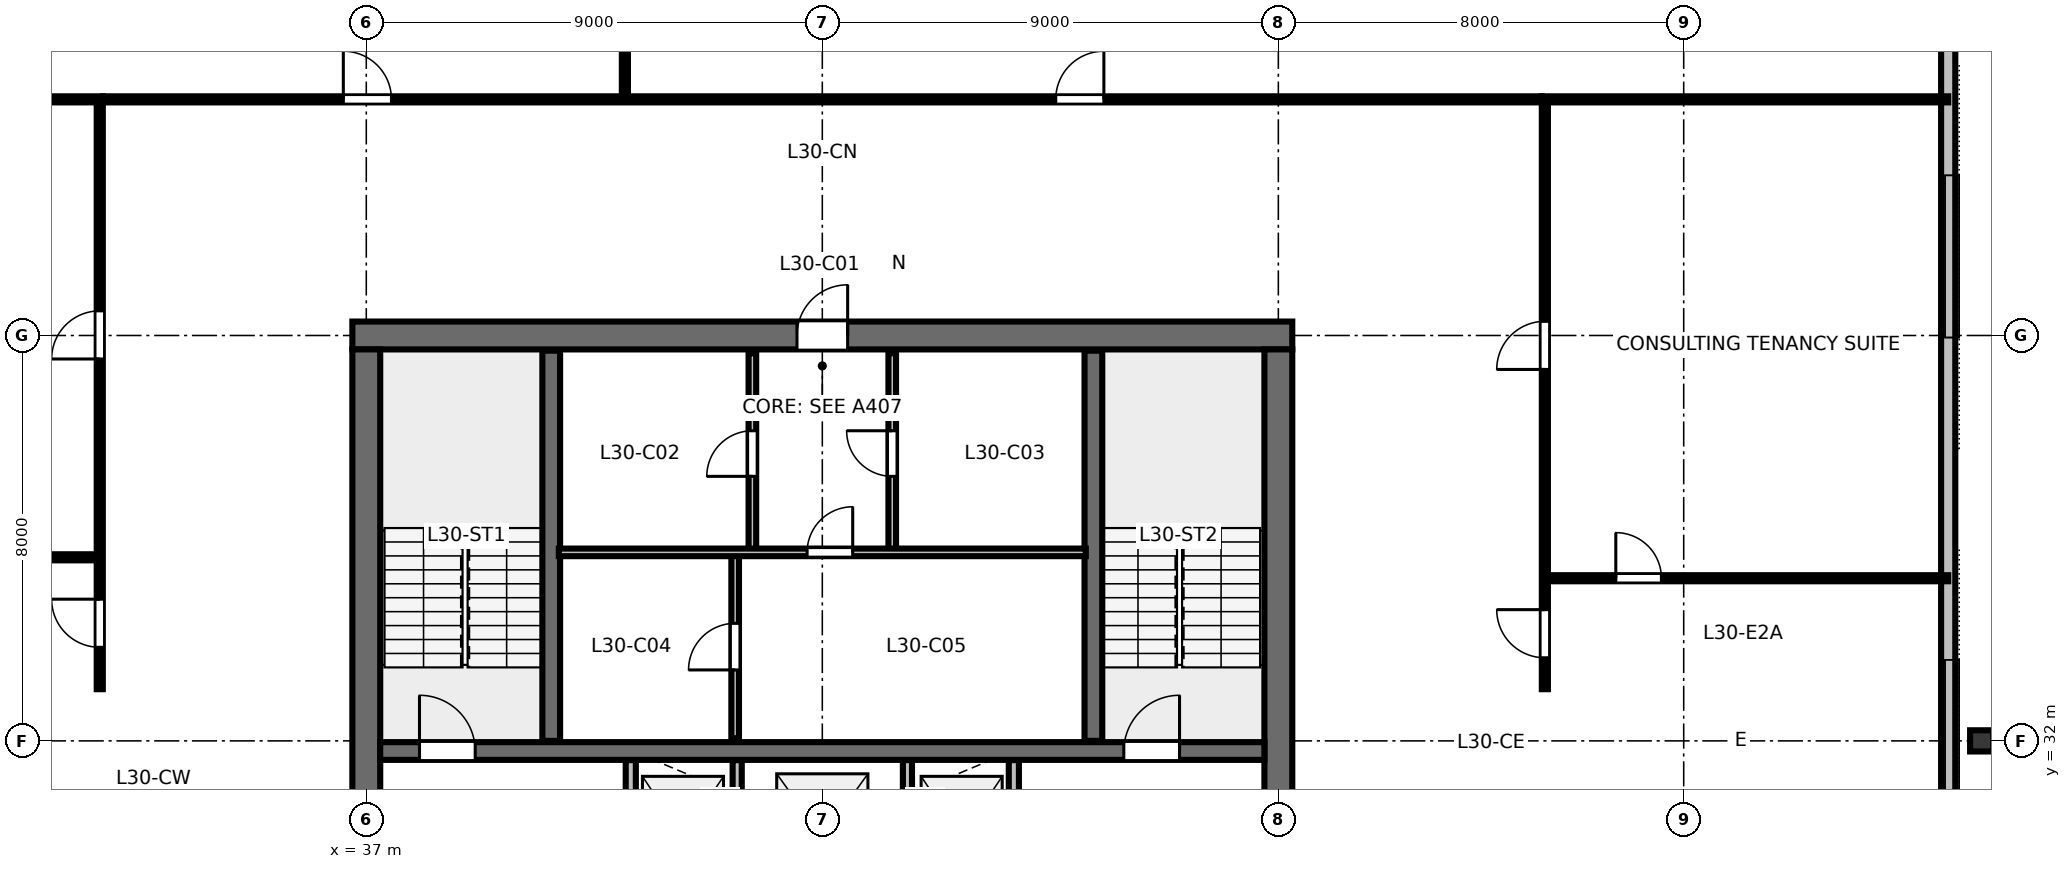
"""IFC4 building model, lengths in metres.
Left out: names, types, materials, properties, quantities, classifications, styles, units other than length and angle.
Written with IfcOpenShell. Run it as: python <this file> out.ifc"""

import sys

from ifc_helpers import new_model, si_unit, direction, frame, frame_2d, origin, origin_2d, place, context, subcontext, project, spatial, rectangle, i_section, extrude, element, fill, save


model = new_model("IFC4")
c1 = context("Model", 3, precision=1e-05, world=origin(), true_north=direction((0.0, 1.0)))
c2 = subcontext(c1, "Body", "Model", "MODEL_VIEW")
j1 = project(units=[si_unit("LENGTHUNIT", "METRE"), si_unit("PLANEANGLEUNIT", "RADIAN")], contexts=[c1])
p1 = place(None, origin())
s1 = spatial("IfcSite", under=j1, at=p1, CompositionType="ELEMENT")
p2 = place(p1, origin())
s2 = spatial("IfcBuilding", under=s1, at=p2, CompositionType="ELEMENT")
p3 = place(p2, frame((0.0, 0.0, 116.8)))
s3 = spatial("IfcBuildingStorey", under=s2, at=p3, CompositionType="ELEMENT", Elevation=116.8)
p4 = place(p3, frame((36.725, 40.0, 0.0), z_axis=(0.0, 0.0, 1.0), x_axis=(1.0, 0.0, 0.0)))
e1 = element("IfcWall", 1, at=p4, inside=s3, PredefinedType="SHEAR", context=c2, shape_type="SweptSolid", body=[
    extrude(rectangle(XDim=18.55, YDim=0.55, at=frame_2d((9.275, 0.0))), origin(), (0.0, 0.0, 1.0), 3.36),
])
p5 = place(p4, frame((8.775, 0.0, 0.0)))
e2 = element("IfcOpeningElement", 2, at=p5, cuts=e1, PredefinedType="OPENING", context=c2, shape_type="SweptSolid", body=[
    extrude(rectangle(XDim=1.0, YDim=2.15, at=frame_2d((0.5, 1.075))), frame((0.0, 0.285, 0.0), z_axis=(0.0, -1.0, 0.0), x_axis=(1.0, 0.0, 0.0)), (0.0, 0.0, 1.0), 0.57),
])
p6 = place(p3, frame((37.0, 24.275, 0.0), z_axis=(0.0, 0.0, 1.0), x_axis=(0.0, 1.0, 0.0)))
e3 = element("IfcWall", 3, at=p6, inside=s3, PredefinedType="SHEAR", context=c2, shape_type="SweptSolid", body=[
    extrude(rectangle(XDim=15.45, YDim=0.55, at=frame_2d((7.725, 0.0))), origin(), (0.0, 0.0, 1.0), 3.36),
])
p7 = place(p6, frame((5.25, 0.0, 0.0)))
e4 = element("IfcOpeningElement", 4, at=p7, cuts=e3, PredefinedType="OPENING", context=c2, shape_type="SweptSolid", body=[
    extrude(rectangle(XDim=1.15, YDim=2.15, at=frame_2d((0.575, 1.075))), frame((0.0, 0.285, 0.0), z_axis=(0.0, -1.0, 0.0), x_axis=(1.0, 0.0, 0.0)), (0.0, 0.0, 1.0), 0.57),
])
p8 = place(p3, frame((55.0, 24.275, 0.0), z_axis=(0.0, 0.0, 1.0), x_axis=(0.0, 1.0, 0.0)))
e5 = element("IfcWall", 5, at=p8, inside=s3, PredefinedType="SHEAR", context=c2, shape_type="SweptSolid", body=[
    extrude(rectangle(XDim=15.45, YDim=0.55, at=frame_2d((7.725, 0.0))), origin(), (0.0, 0.0, 1.0), 3.36),
])
p9 = place(p8, frame((5.25, 0.0, 0.0)))
e6 = element("IfcOpeningElement", 6, at=p9, cuts=e5, PredefinedType="OPENING", context=c2, shape_type="SweptSolid", body=[
    extrude(rectangle(XDim=1.15, YDim=2.15, at=frame_2d((0.575, 1.075))), frame((0.0, 0.285, 0.0), z_axis=(0.0, -1.0, 0.0), x_axis=(1.0, 0.0, 0.0)), (0.0, 0.0, 1.0), 0.57),
])
p10 = place(p3, frame((37.275, 31.8, 0.0), z_axis=(0.0, 0.0, 1.0), x_axis=(1.0, 0.0, 0.0)))
e7 = element("IfcWall", 7, at=p10, inside=s3, PredefinedType="SHEAR", context=c2, shape_type="SweptSolid", body=[
    extrude(rectangle(XDim=17.45, YDim=0.35, at=frame_2d((8.725, 0.0))), origin(), (0.0, 0.0, 1.0), 3.36),
])
p11 = place(p10, frame((0.775, 0.0, 0.0)))
e8 = element("IfcOpeningElement", 8, at=p11, cuts=e7, PredefinedType="OPENING", context=c2, shape_type="SweptSolid", body=[
    extrude(rectangle(XDim=1.1, YDim=2.15, at=frame_2d((0.55, 1.075))), frame((0.0, 0.185, 0.0), z_axis=(0.0, -1.0, 0.0), x_axis=(1.0, 0.0, 0.0)), (0.0, 0.0, 1.0), 0.37),
])
p12 = place(p10, frame((14.675, 0.0, 0.0)))
e9 = element("IfcOpeningElement", 9, at=p12, cuts=e7, PredefinedType="OPENING", context=c2, shape_type="SweptSolid", body=[
    extrude(rectangle(XDim=1.1, YDim=2.15, at=frame_2d((0.55, 1.075))), frame((0.0, 0.185, 0.0), z_axis=(0.0, -1.0, 0.0), x_axis=(1.0, 0.0, 0.0)), (0.0, 0.0, 1.0), 0.37),
])
p13 = place(p3, frame((68.88, 32.0, 0.0), z_axis=(0.0, 0.0, 1.0), x_axis=(0.0, 1.0, 0.0)))
e10 = element("IfcColumn", 10, at=p13, inside=s3, PredefinedType="COLUMN", context=c2, shape_type="SweptSolid", body=[
    extrude(i_section(OverallWidth=0.418, OverallDepth=0.455, WebThickness=0.042, FlangeThickness=0.068, FilletRadius=0.025, at=origin_2d()), origin(), (0.0, 0.0, 1.0), 3.358),
])
p14 = place(p3, frame((68.22, 16.76, 0.0), z_axis=(0.0, 0.0, 1.0), x_axis=(0.0, 1.0, 0.0)))
e11 = element("IfcWall", 11, at=p14, inside=s3, PredefinedType="STANDARD", context=c2, shape_type="SweptSolid", body=[
    extrude(rectangle(XDim=30.48, YDim=0.28, at=frame_2d((15.24, 0.0))), origin(), (0.0, 0.0, 1.0), 3.36),
])
for number, where, z_axis, x_axis in (
    (12, (40.65, 32.0, 0.0), (0.0, 0.0, 1.0), (0.0, 1.0, 0.0)),
    (13, (51.35, 32.0, 0.0), (0.0, 0.0, 1.0), (0.0, 1.0, 0.0)),
):
    element("IfcWall", number, at=place(p3, frame(where, z_axis=z_axis, x_axis=x_axis)), inside=s3, PredefinedType="SHEAR", context=c2, shape_type="SweptSolid", body=[
        extrude(rectangle(XDim=7.7, YDim=0.35, at=frame_2d((3.85, 0.0))), origin(), (0.0, 0.0, 1.0), 3.6),
    ])
p15 = place(p3, frame((44.62, 35.72, 0.0), z_axis=(0.0, 0.0, 1.0), x_axis=(0.0, 1.0, 0.0)))
e14 = element("IfcWall", 14, at=p15, inside=s3, PredefinedType="PARTITIONING", context=c2, shape_type="SweptSolid", body=[
    extrude(rectangle(XDim=3.93, YDim=0.15, at=frame_2d((1.965, 0.0))), origin(), (0.0, 0.0, 1.0), 3.36),
])
p16 = place(p15, frame((1.5, 0.0, 0.0)))
e15 = element("IfcOpeningElement", 15, at=p16, cuts=e14, PredefinedType="OPENING", context=c2, shape_type="SweptSolid", body=[
    extrude(rectangle(XDim=0.9, YDim=2.15, at=frame_2d((0.45, 1.075))), frame((0.0, 0.085, 0.0), z_axis=(0.0, -1.0, 0.0), x_axis=(1.0, 0.0, 0.0)), (0.0, 0.0, 1.0), 0.17),
])
p17 = place(p3, frame((47.38, 35.72, 0.0), z_axis=(0.0, 0.0, 1.0), x_axis=(0.0, 1.0, 0.0)))
e16 = element("IfcWall", 16, at=p17, inside=s3, PredefinedType="PARTITIONING", context=c2, shape_type="SweptSolid", body=[
    extrude(rectangle(XDim=3.93, YDim=0.15, at=frame_2d((1.965, 0.0))), origin(), (0.0, 0.0, 1.0), 3.36),
])
p18 = place(p17, frame((1.5, 0.0, 0.0)))
e17 = element("IfcOpeningElement", 17, at=p18, cuts=e16, PredefinedType="OPENING", context=c2, shape_type="SweptSolid", body=[
    extrude(rectangle(XDim=0.9, YDim=2.15, at=frame_2d((0.45, 1.075))), frame((0.0, 0.085, 0.0), z_axis=(0.0, -1.0, 0.0), x_axis=(1.0, 0.0, 0.0)), (0.0, 0.0, 1.0), 0.17),
])
p19 = place(p3, frame((44.28, 32.05, 0.0), z_axis=(0.0, 0.0, 1.0), x_axis=(0.0, 1.0, 0.0)))
e18 = element("IfcWall", 18, at=p19, inside=s3, PredefinedType="PARTITIONING", context=c2, shape_type="SweptSolid", body=[
    extrude(rectangle(XDim=3.67, YDim=0.15, at=frame_2d((1.835, 0.0))), origin(), (0.0, 0.0, 1.0), 3.36),
])
p20 = place(p19, frame((1.35, 0.0, 0.0)))
e19 = element("IfcOpeningElement", 19, at=p20, cuts=e18, PredefinedType="OPENING", context=c2, shape_type="SweptSolid", body=[
    extrude(rectangle(XDim=0.92, YDim=2.15, at=frame_2d((0.46, 1.075))), frame((0.0, 0.085, 0.0), z_axis=(0.0, -1.0, 0.0), x_axis=(1.0, 0.0, 0.0)), (0.0, 0.0, 1.0), 0.17),
])
p21 = place(p3, frame((40.8, 35.72, 0.0), z_axis=(0.0, 0.0, 1.0), x_axis=(1.0, 0.0, 0.0)))
e20 = element("IfcWall", 20, at=p21, inside=s3, PredefinedType="PARTITIONING", context=c2, shape_type="SweptSolid", body=[
    extrude(rectangle(XDim=10.4, YDim=0.15, at=frame_2d((5.2, 0.0))), origin(), (0.0, 0.0, 1.0), 3.36),
])
p22 = place(p21, frame((4.9, 0.0, 0.0)))
e21 = element("IfcOpeningElement", 21, at=p22, cuts=e20, PredefinedType="OPENING", context=c2, shape_type="SweptSolid", body=[
    extrude(rectangle(XDim=0.9, YDim=2.15, at=frame_2d((0.45, 1.075))), frame((0.0, 0.085, 0.0), z_axis=(0.0, -1.0, 0.0), x_axis=(1.0, 0.0, 0.0)), (0.0, 0.0, 1.0), 0.17),
])
p23 = place(p3, frame((42.22, 28.58, 0.0), z_axis=(0.0, 0.0, 1.0), x_axis=(0.0, 1.0, 0.0)))
e22 = element("IfcWall", 22, at=p23, inside=s3, PredefinedType="PARTITIONING", context=c2, shape_type="SweptSolid", body=[
    extrude(rectangle(XDim=3.04, YDim=0.2, at=frame_2d((1.52, 0.0))), origin(), (0.0, 0.0, 1.0), 3.36),
])
p24 = place(p23, frame((0.95, 0.0, 0.0)))
e23 = element("IfcOpeningElement", 23, at=p24, cuts=e22, PredefinedType="OPENING", context=c2, shape_type="SweptSolid", body=[
    extrude(rectangle(XDim=1.05, YDim=2.15, at=frame_2d((0.525, 1.075))), frame((0.0, 0.11, 0.0), z_axis=(0.0, -1.0, 0.0), x_axis=(1.0, 0.0, 0.0)), (0.0, 0.0, 1.0), 0.22),
])
p25 = place(p3, frame((49.78, 28.58, 0.0), z_axis=(0.0, 0.0, 1.0), x_axis=(0.0, 1.0, 0.0)))
e24 = element("IfcWall", 24, at=p25, inside=s3, PredefinedType="PARTITIONING", context=c2, shape_type="SweptSolid", body=[
    extrude(rectangle(XDim=3.04, YDim=0.2, at=frame_2d((1.52, 0.0))), origin(), (0.0, 0.0, 1.0), 3.36),
])
p26 = place(p25, frame((0.95, 0.0, 0.0)))
e25 = element("IfcOpeningElement", 25, at=p26, cuts=e24, PredefinedType="OPENING", context=c2, shape_type="SweptSolid", body=[
    extrude(rectangle(XDim=1.05, YDim=2.15, at=frame_2d((0.525, 1.075))), frame((0.0, 0.11, 0.0), z_axis=(0.0, -1.0, 0.0), x_axis=(1.0, 0.0, 0.0)), (0.0, 0.0, 1.0), 0.22),
])
for number, where, z_axis, x_axis in (
    (26, (44.32, 28.58, 0.0), (0.0, 0.0, 1.0), (0.0, 1.0, 0.0)),
    (27, (47.68, 28.58, 0.0), (0.0, 0.0, 1.0), (0.0, 1.0, 0.0)),
):
    element("IfcWall", number, at=place(p3, frame(where, z_axis=z_axis, x_axis=x_axis)), inside=s3, PredefinedType="PARTITIONING", context=c2, shape_type="SweptSolid", body=[
        extrude(rectangle(XDim=3.04, YDim=0.18, at=frame_2d((1.52, 0.0))), origin(), (0.0, 0.0, 1.0), 3.36),
    ])
p27 = place(p3, frame((42.104, 44.66, 0.0), z_axis=(0.0, 0.0, 1.0), x_axis=(0.0, 1.0, 0.0)))
e28 = element("IfcWall", 28, at=p27, inside=s3, PredefinedType="PARTITIONING", context=c2, shape_type="SweptSolid", body=[
    extrude(rectangle(XDim=6.96, YDim=0.12, at=frame_2d((3.48, 0.0))), origin(), (0.0, 0.0, 1.0), 2.64),
])
p28 = place(p27, frame((1.4, 0.0, 0.0)))
e29 = element("IfcOpeningElement", 29, at=p28, cuts=e28, PredefinedType="OPENING", context=c2, shape_type="SweptSolid", body=[
    extrude(rectangle(XDim=0.9, YDim=2.15, at=frame_2d((0.45, 1.075))), frame((0.0, 0.07, 0.0), z_axis=(0.0, -1.0, 0.0), x_axis=(1.0, 0.0, 0.0)), (0.0, 0.0, 1.0), 0.14),
])
p29 = place(p3, frame((31.8, 44.66, 0.0), z_axis=(0.0, 0.0, 1.0), x_axis=(1.0, 0.0, 0.0)))
e30 = element("IfcWall", 30, at=p29, inside=s3, PredefinedType="PARTITIONING", context=c2, shape_type="SweptSolid", body=[
    extrude(rectangle(XDim=28.4, YDim=0.12, at=frame_2d((14.2, 0.0))), origin(), (0.0, 0.0, 1.0), 2.64),
])
p30 = place(p29, frame((4.747, 0.0, 0.0)))
e31 = element("IfcOpeningElement", 31, at=p30, cuts=e30, PredefinedType="OPENING", context=c2, shape_type="SweptSolid", body=[
    extrude(rectangle(XDim=0.95, YDim=2.15, at=frame_2d((0.475, 1.075))), frame((0.0, 0.07, 0.0), z_axis=(0.0, -1.0, 0.0), x_axis=(1.0, 0.0, 0.0)), (0.0, 0.0, 1.0), 0.14),
])
p31 = place(p29, frame((18.807, 0.0, 0.0)))
e32 = element("IfcOpeningElement", 32, at=p31, cuts=e30, PredefinedType="OPENING", context=c2, shape_type="SweptSolid", body=[
    extrude(rectangle(XDim=0.95, YDim=2.15, at=frame_2d((0.475, 1.075))), frame((0.0, 0.07, 0.0), z_axis=(0.0, -1.0, 0.0), x_axis=(1.0, 0.0, 0.0)), (0.0, 0.0, 1.0), 0.14),
])
p32 = place(p3, frame((31.74, 35.623, 0.0), z_axis=(0.0, 0.0, 1.0), x_axis=(-1.0, 0.0, 0.0)))
e33 = element("IfcWall", 33, at=p32, inside=s3, PredefinedType="PARTITIONING", context=c2, shape_type="SweptSolid", body=[
    extrude(rectangle(XDim=7.96, YDim=0.12, at=frame_2d((3.98, 0.0))), origin(), (0.0, 0.0, 1.0), 2.64),
])
p33 = place(p32, frame((1.4, 0.0, 0.0)))
e34 = element("IfcOpeningElement", 34, at=p33, cuts=e33, PredefinedType="OPENING", context=c2, shape_type="SweptSolid", body=[
    extrude(rectangle(XDim=0.9, YDim=2.15, at=frame_2d((0.45, 1.075))), frame((0.0, 0.07, 0.0), z_axis=(0.0, -1.0, 0.0), x_axis=(1.0, 0.0, 0.0)), (0.0, 0.0, 1.0), 0.14),
])
p34 = place(p3, frame((31.74, 33.02, 0.0), z_axis=(0.0, 0.0, 1.0), x_axis=(0.0, 1.0, 0.0)))
e35 = element("IfcWall", 35, at=p34, inside=s3, PredefinedType="PARTITIONING", context=c2, shape_type="SweptSolid", body=[
    extrude(rectangle(XDim=11.58, YDim=0.12, at=frame_2d((5.79, 0.0))), origin(), (0.0, 0.0, 1.0), 2.64),
])
p35 = place(p34, frame((0.826, 0.0, 0.0)))
e36 = element("IfcOpeningElement", 36, at=p35, cuts=e35, PredefinedType="OPENING", context=c2, shape_type="SweptSolid", body=[
    extrude(rectangle(XDim=0.95, YDim=2.15, at=frame_2d((0.475, 1.075))), frame((0.0, 0.07, 0.0), z_axis=(0.0, -1.0, 0.0), x_axis=(1.0, 0.0, 0.0)), (0.0, 0.0, 1.0), 0.14),
])
p36 = place(p34, frame((6.516, 0.0, 0.0)))
e37 = element("IfcOpeningElement", 37, at=p36, cuts=e35, PredefinedType="OPENING", context=c2, shape_type="SweptSolid", body=[
    extrude(rectangle(XDim=0.95, YDim=2.15, at=frame_2d((0.475, 1.075))), frame((0.0, 0.07, 0.0), z_axis=(0.0, -1.0, 0.0), x_axis=(1.0, 0.0, 0.0)), (0.0, 0.0, 1.0), 0.14),
])
p37 = place(p3, frame((60.26, 35.209, 0.0), z_axis=(0.0, 0.0, 1.0), x_axis=(1.0, 0.0, 0.0)))
e38 = element("IfcWall", 38, at=p37, inside=s3, PredefinedType="PARTITIONING", context=c2, shape_type="SweptSolid", body=[
    extrude(rectangle(XDim=7.96, YDim=0.12, at=frame_2d((3.98, 0.0))), origin(), (0.0, 0.0, 1.0), 2.64),
])
p38 = place(p37, frame((1.4, 0.0, 0.0)))
e39 = element("IfcOpeningElement", 39, at=p38, cuts=e38, PredefinedType="OPENING", context=c2, shape_type="SweptSolid", body=[
    extrude(rectangle(XDim=0.9, YDim=2.15, at=frame_2d((0.45, 1.075))), frame((0.0, 0.07, 0.0), z_axis=(0.0, -1.0, 0.0), x_axis=(1.0, 0.0, 0.0)), (0.0, 0.0, 1.0), 0.14),
])
p39 = place(p3, frame((60.26, 33.02, 0.0), z_axis=(0.0, 0.0, 1.0), x_axis=(0.0, 1.0, 0.0)))
e40 = element("IfcWall", 40, at=p39, inside=s3, PredefinedType="PARTITIONING", context=c2, shape_type="SweptSolid", body=[
    extrude(rectangle(XDim=11.58, YDim=0.12, at=frame_2d((5.79, 0.0))), origin(), (0.0, 0.0, 1.0), 2.64),
])
p40 = place(p39, frame((0.62, 0.0, 0.0)))
e41 = element("IfcOpeningElement", 41, at=p40, cuts=e40, PredefinedType="OPENING", context=c2, shape_type="SweptSolid", body=[
    extrude(rectangle(XDim=0.95, YDim=2.15, at=frame_2d((0.475, 1.075))), frame((0.0, 0.07, 0.0), z_axis=(0.0, -1.0, 0.0), x_axis=(1.0, 0.0, 0.0)), (0.0, 0.0, 1.0), 0.14),
])
p41 = place(p39, frame((6.31, 0.0, 0.0)))
e42 = element("IfcOpeningElement", 42, at=p41, cuts=e40, PredefinedType="OPENING", context=c2, shape_type="SweptSolid", body=[
    extrude(rectangle(XDim=0.95, YDim=2.15, at=frame_2d((0.475, 1.075))), frame((0.0, 0.07, 0.0), z_axis=(0.0, -1.0, 0.0), x_axis=(1.0, 0.0, 0.0)), (0.0, 0.0, 1.0), 0.14),
])
for number, where, z_axis, x_axis in (
    (43, (31.8, 44.66, 0.0), (0.0, 0.0, 1.0), (-1.0, 0.0, 0.0)),
    (44, (60.2, 44.66, 0.0), (0.0, 0.0, 1.0), (1.0, 0.0, 0.0)),
):
    element("IfcWall", number, at=place(p3, frame(where, z_axis=z_axis, x_axis=x_axis)), inside=s3, PredefinedType="PARTITIONING", context=c2, shape_type="SweptSolid", body=[
        extrude(rectangle(XDim=8.02, YDim=0.12, at=frame_2d((4.01, 0.0))), origin(), (0.0, 0.0, 1.0), 2.64),
    ])
p42 = place(p11, origin())
e45 = element("IfcDoor", 45, at=p42, inside=s3, OperationType="SINGLE_SWING_LEFT", PredefinedType="DOOR", context=c2, shape_type="SweptSolid", body=[
    extrude(rectangle(XDim=1.1, YDim=2.15, at=frame_2d((0.55, 1.075))), frame((0.0, 0.025, 0.0), z_axis=(0.0, -1.0, 0.0), x_axis=(1.0, 0.0, 0.0)), (0.0, 0.0, 1.0), 0.05),
])
fill(e8, e45)
p43 = place(p12, origin())
e46 = element("IfcDoor", 46, at=p43, inside=s3, OperationType="SINGLE_SWING_RIGHT", PredefinedType="DOOR", context=c2, shape_type="SweptSolid", body=[
    extrude(rectangle(XDim=1.1, YDim=2.15, at=frame_2d((0.55, 1.075))), frame((0.0, 0.025, 0.0), z_axis=(0.0, -1.0, 0.0), x_axis=(1.0, 0.0, 0.0)), (0.0, 0.0, 1.0), 0.05),
])
fill(e9, e46)
p44 = place(p5, origin())
e47 = element("IfcDoor", 47, at=p44, inside=s3, OperationType="SINGLE_SWING_RIGHT", PredefinedType="DOOR", context=c2, shape_type="SweptSolid", body=[
    extrude(rectangle(XDim=1.0, YDim=2.15, at=frame_2d((0.5, 1.075))), frame((0.0, 0.025, 0.0), z_axis=(0.0, -1.0, 0.0), x_axis=(1.0, 0.0, 0.0)), (0.0, 0.0, 1.0), 0.05),
])
fill(e2, e47)
p45 = place(p16, origin())
e48 = element("IfcDoor", 48, at=p45, inside=s3, OperationType="SINGLE_SWING_LEFT", PredefinedType="DOOR", context=c2, shape_type="SweptSolid", body=[
    extrude(rectangle(XDim=0.9, YDim=2.15, at=frame_2d((0.45, 1.075))), frame((0.0, 0.025, 0.0), z_axis=(0.0, -1.0, 0.0), x_axis=(1.0, 0.0, 0.0)), (0.0, 0.0, 1.0), 0.05),
])
fill(e15, e48)
p46 = place(p18, origin())
e49 = element("IfcDoor", 49, at=p46, inside=s3, OperationType="SINGLE_SWING_RIGHT", PredefinedType="DOOR", context=c2, shape_type="SweptSolid", body=[
    extrude(rectangle(XDim=0.9, YDim=2.15, at=frame_2d((0.45, 1.075))), frame((0.0, 0.025, 0.0), z_axis=(0.0, -1.0, 0.0), x_axis=(1.0, 0.0, 0.0)), (0.0, 0.0, 1.0), 0.05),
])
fill(e17, e49)
p47 = place(p20, origin())
e50 = element("IfcDoor", 50, at=p47, inside=s3, OperationType="SINGLE_SWING_LEFT", PredefinedType="DOOR", context=c2, shape_type="SweptSolid", body=[
    extrude(rectangle(XDim=0.92, YDim=2.15, at=frame_2d((0.46, 1.075))), frame((0.0, 0.025, 0.0), z_axis=(0.0, -1.0, 0.0), x_axis=(1.0, 0.0, 0.0)), (0.0, 0.0, 1.0), 0.05),
])
fill(e19, e50)
p48 = place(p22, origin())
e51 = element("IfcDoor", 51, at=p48, inside=s3, OperationType="SINGLE_SWING_RIGHT", PredefinedType="DOOR", context=c2, shape_type="SweptSolid", body=[
    extrude(rectangle(XDim=0.9, YDim=2.15, at=frame_2d((0.45, 1.075))), frame((0.0, 0.025, 0.0), z_axis=(0.0, -1.0, 0.0), x_axis=(1.0, 0.0, 0.0)), (0.0, 0.0, 1.0), 0.05),
])
fill(e21, e51)
p49 = place(p30, origin())
e52 = element("IfcDoor", 52, at=p49, inside=s3, OperationType="SINGLE_SWING_LEFT", PredefinedType="DOOR", context=c2, shape_type="SweptSolid", body=[
    extrude(rectangle(XDim=0.95, YDim=2.15, at=frame_2d((0.475, 1.075))), frame((0.0, 0.025, 0.0), z_axis=(0.0, -1.0, 0.0), x_axis=(1.0, 0.0, 0.0)), (0.0, 0.0, 1.0), 0.05),
])
fill(e31, e52)
p50 = place(p31, origin())
e53 = element("IfcDoor", 53, at=p50, inside=s3, OperationType="SINGLE_SWING_RIGHT", PredefinedType="DOOR", context=c2, shape_type="SweptSolid", body=[
    extrude(rectangle(XDim=0.95, YDim=2.15, at=frame_2d((0.475, 1.075))), frame((0.0, 0.025, 0.0), z_axis=(0.0, -1.0, 0.0), x_axis=(1.0, 0.0, 0.0)), (0.0, 0.0, 1.0), 0.05),
])
fill(e32, e53)
p51 = place(p35, origin())
e54 = element("IfcDoor", 54, at=p51, inside=s3, OperationType="SINGLE_SWING_RIGHT", PredefinedType="DOOR", context=c2, shape_type="SweptSolid", body=[
    extrude(rectangle(XDim=0.95, YDim=2.15, at=frame_2d((0.475, 1.075))), frame((0.0, 0.025, 0.0), z_axis=(0.0, -1.0, 0.0), x_axis=(1.0, 0.0, 0.0)), (0.0, 0.0, 1.0), 0.05),
])
fill(e36, e54)
p52 = place(p36, origin())
e55 = element("IfcDoor", 55, at=p52, inside=s3, OperationType="SINGLE_SWING_LEFT", PredefinedType="DOOR", context=c2, shape_type="SweptSolid", body=[
    extrude(rectangle(XDim=0.95, YDim=2.15, at=frame_2d((0.475, 1.075))), frame((0.0, 0.025, 0.0), z_axis=(0.0, -1.0, 0.0), x_axis=(1.0, 0.0, 0.0)), (0.0, 0.0, 1.0), 0.05),
])
fill(e37, e55)
p53 = place(p38, origin())
e56 = element("IfcDoor", 56, at=p53, inside=s3, OperationType="SINGLE_SWING_LEFT", PredefinedType="DOOR", context=c2, shape_type="SweptSolid", body=[
    extrude(rectangle(XDim=0.9, YDim=2.15, at=frame_2d((0.45, 1.075))), frame((0.0, 0.025, 0.0), z_axis=(0.0, -1.0, 0.0), x_axis=(1.0, 0.0, 0.0)), (0.0, 0.0, 1.0), 0.05),
])
fill(e39, e56)
p54 = place(p40, origin())
e57 = element("IfcDoor", 57, at=p54, inside=s3, OperationType="SINGLE_SWING_RIGHT", PredefinedType="DOOR", context=c2, shape_type="SweptSolid", body=[
    extrude(rectangle(XDim=0.95, YDim=2.15, at=frame_2d((0.475, 1.075))), frame((0.0, 0.025, 0.0), z_axis=(0.0, -1.0, 0.0), x_axis=(1.0, 0.0, 0.0)), (0.0, 0.0, 1.0), 0.05),
])
fill(e41, e57)
p55 = place(p41, origin())
e58 = element("IfcDoor", 58, at=p55, inside=s3, OperationType="SINGLE_SWING_LEFT", PredefinedType="DOOR", context=c2, shape_type="SweptSolid", body=[
    extrude(rectangle(XDim=0.95, YDim=2.15, at=frame_2d((0.475, 1.075))), frame((0.0, 0.025, 0.0), z_axis=(0.0, -1.0, 0.0), x_axis=(1.0, 0.0, 0.0)), (0.0, 0.0, 1.0), 0.05),
])
fill(e42, e58)
save(model, sys.argv[1])
